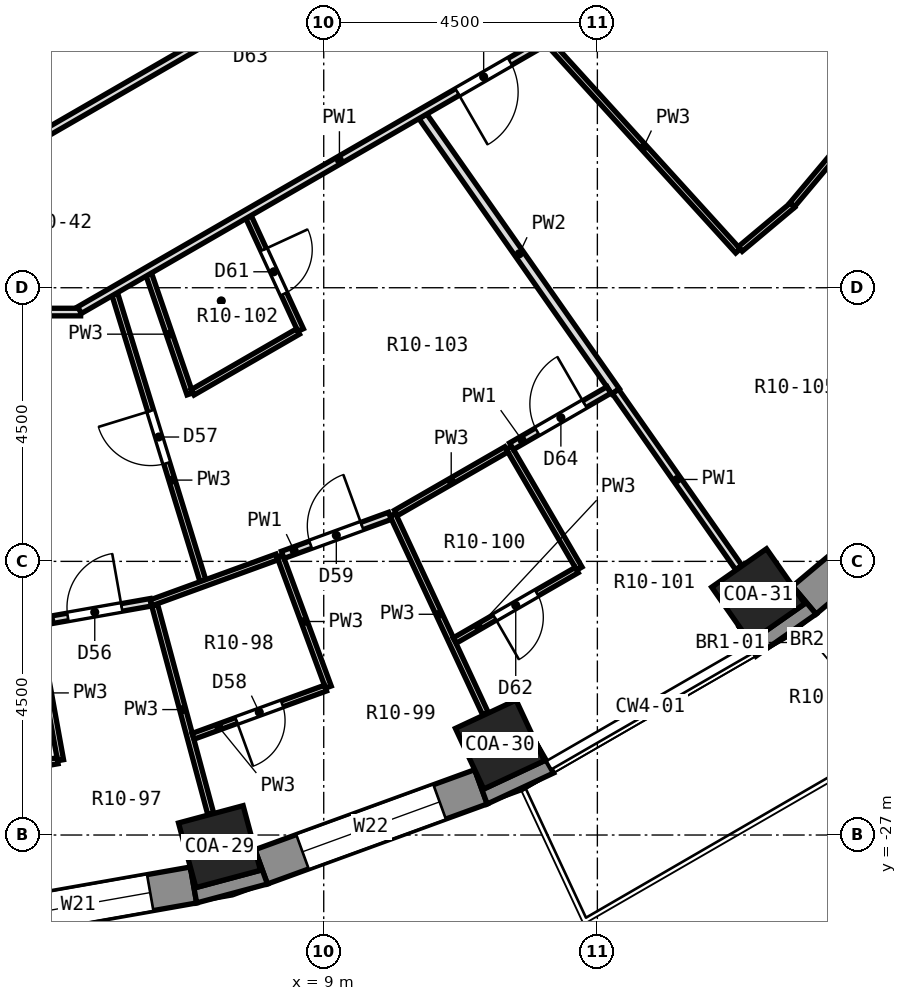
"""IFC4 building model, lengths in metres.
Left out: names, types, materials, properties, quantities, classifications, styles, units other than length and angle.
Written with IfcOpenShell. Run it as: python <this file> out.ifc"""

import sys

from ifc_helpers import new_model, si_unit, direction, frame, frame_2d, origin, origin_2d, place, context, subcontext, project, spatial, polyline, rectangle, outline, extrude, element, fill, save


model = new_model("IFC4")
c1 = context("Model", 3, precision=1e-05, world=origin(), true_north=direction((0.0, 1.0)))
c2 = subcontext(c1, "Body", "Model", "MODEL_VIEW")
j1 = project(units=[si_unit("LENGTHUNIT", "METRE"), si_unit("PLANEANGLEUNIT", "RADIAN")], contexts=[c1])
p1 = place(None, origin())
s1 = spatial("IfcSite", under=j1, at=p1, CompositionType="ELEMENT")
p2 = place(p1, origin())
s2 = spatial("IfcBuilding", under=s1, at=p2, CompositionType="ELEMENT")
p3 = place(p2, frame((0.0, 0.0, 36.2)))
s3 = spatial("IfcBuildingStorey", under=s2, at=p3, CompositionType="ELEMENT", Elevation=36.2)
for number, where, z_axis, x_axis in (
    (1, (7.286, -27.191, 0.0), (0.0, 0.0, 1.0), (0.259, -0.966, 0.0)),
    (2, (11.897, -25.512, 0.0), (0.0, 0.0, 1.0), (0.423, -0.906, 0.0)),
    (3, (16.146, -23.059, 0.0), (0.0, 0.0, 1.0), (0.574, -0.819, 0.0)),
):
    element("IfcColumn", number, at=place(p3, frame(where, z_axis=z_axis, x_axis=x_axis)), inside=s3, PredefinedType="COLUMN", context=c2, shape_type="SweptSolid", body=[
        extrude(rectangle(XDim=1.1, YDim=1.1, at=origin_2d()), origin(), (0.0, 0.0, 1.0), 3.3),
    ])
p4 = place(p3, frame((3.071, -28.489, 0.0), z_axis=(0.0, 0.0, 1.0), x_axis=(0.984800809218, 0.173687553279, 0.0)))
e4 = element("IfcWall", 4, at=p4, inside=s3, PredefinedType="SOLIDWALL", context=c2, shape_type="SweptSolid", body=[
    extrude(rectangle(XDim=3.846, YDim=0.6, at=frame_2d((1.923, 0.0))), origin(), (0.0, 0.0, 1.0), 2.75),
])
p5 = place(p4, frame((0.723, 0.0, 0.9)))
e5 = element("IfcOpeningElement", 5, at=p5, cuts=e4, PredefinedType="OPENING", context=c2, shape_type="SweptSolid", body=[
    extrude(rectangle(XDim=2.4, YDim=1.8, at=frame_2d((1.2, 0.9))), frame((0.0, 0.312, 0.0), z_axis=(0.0, -1.0, 0.0), x_axis=(1.0, 0.0, 0.0)), (0.0, 0.0, 1.0), 0.624),
])
p6 = place(p3, frame((7.971, -27.523, 0.0), z_axis=(0.0, 0.0, 1.0), x_axis=(0.939689588564, 0.342028474173, 0.0)))
e6 = element("IfcWall", 6, at=p6, inside=s3, PredefinedType="SOLIDWALL", context=c2, shape_type="SweptSolid", body=[
    extrude(rectangle(XDim=3.846, YDim=0.6, at=frame_2d((1.923, 0.0))), origin(), (0.0, 0.0, 1.0), 2.75),
])
p7 = place(p6, frame((0.723, 0.0, 0.9)))
e7 = element("IfcOpeningElement", 7, at=p7, cuts=e6, PredefinedType="OPENING", context=c2, shape_type="SweptSolid", body=[
    extrude(rectangle(XDim=2.4, YDim=1.8, at=frame_2d((1.2, 0.9))), frame((0.0, 0.312, 0.0), z_axis=(0.0, -1.0, 0.0), x_axis=(1.0, 0.0, 0.0)), (0.0, 0.0, 1.0), 0.624),
])
p8 = place(p3, frame((16.904, -23.137, 0.0), z_axis=(0.0, 0.0, 1.0), x_axis=(0.766026164483, 0.642809392687, 0.0)))
e8 = element("IfcWall", 8, at=p8, inside=s3, PredefinedType="SOLIDWALL", context=c2, shape_type="SweptSolid", body=[
    extrude(rectangle(XDim=3.846, YDim=0.6, at=frame_2d((1.923, 0.0))), origin(), (0.0, 0.0, 1.0), 2.75),
])
p9 = place(p8, frame((1.023, 0.0, 0.0)))
e9 = element("IfcOpeningElement", 9, at=p9, cuts=e8, PredefinedType="OPENING", context=c2, shape_type="SweptSolid", body=[
    extrude(rectangle(XDim=1.8, YDim=2.4, at=frame_2d((0.9, 1.2))), frame((0.0, 0.312, 0.0), z_axis=(0.0, -1.0, 0.0), x_axis=(1.0, 0.0, 0.0)), (0.0, 0.0, 1.0), 0.624),
])
p10 = place(p3, origin())
e10 = element("IfcWall", 10, at=p10, inside=s3, PredefinedType="SOLIDWALL", context=c2, shape_type="SweptSolid", body=[
    extrude(outline(polyline([(6.91, -28.117), (8.074, -27.805), (7.869, -27.241), (7.959, -27.58), (6.897, -27.865), (6.806, -27.526), (6.91, -28.117)])), origin(), (0.0, 0.0, 1.0), 2.75),
])
p11 = place(p3, origin())
e11 = element("IfcWall", 11, at=p11, inside=s3, PredefinedType="SOLIDWALL", context=c2, shape_type="SweptSolid", body=[
    extrude(outline(polyline([(12.78, -25.981), (12.479, -25.461), (12.628, -25.779), (11.631, -26.243), (11.483, -25.926), (11.688, -26.49), (12.78, -25.981)])), origin(), (0.0, 0.0, 1.0), 2.75),
])
p12 = place(p3, origin())
e12 = element("IfcWall", 12, at=p12, inside=s3, PredefinedType="SOLIDWALL", context=c2, shape_type="SweptSolid", body=[
    extrude(outline(polyline([(16.11, -24.058), (17.097, -23.367), (16.711, -22.907), (16.912, -23.194), (16.011, -23.825), (15.81, -23.538), (16.11, -24.058)])), origin(), (0.0, 0.0, 1.0), 2.75),
])
p13 = place(p3, frame((4.271, -23.556, 0.0), z_axis=(0.0, 0.0, 1.0), x_axis=(0.178283818946, -0.983979105419, 0.0)))
e13 = element("IfcWall", 13, at=p13, inside=s3, PredefinedType="PARTITIONING", context=c2, shape_type="SweptSolid", body=[
    extrude(rectangle(XDim=2.25, YDim=0.1, at=frame_2d((1.125, 0.0))), origin(), (0.0, 0.0, 1.0), 2.75),
])
p14 = place(p3, frame((6.221, -23.225, 0.0), z_axis=(0.0, 0.0, 1.0), x_axis=(0.259393262225, -0.965771782313, 0.0)))
e14 = element("IfcWall", 14, at=p14, inside=s3, PredefinedType="PARTITIONING", context=c2, shape_type="SweptSolid", body=[
    extrude(rectangle(XDim=3.546, YDim=0.1, at=frame_2d((1.773, 0.0))), origin(), (0.0, 0.0, 1.0), 2.75),
])
p15 = place(p3, frame((5.563, -18.105, 0.0), z_axis=(0.0, 0.0, 1.0), x_axis=(0.293856171107, -0.955849648586, 0.0)))
e15 = element("IfcWall", 15, at=p15, inside=s3, PredefinedType="PARTITIONING", context=c2, shape_type="SweptSolid", body=[
    extrude(rectangle(XDim=4.93, YDim=0.1, at=frame_2d((2.465, 0.0))), origin(), (0.0, 0.0, 1.0), 2.75),
])
p16 = place(p15, frame((2.009, 0.0, 0.0)))
e16 = element("IfcOpeningElement", 16, at=p16, cuts=e15, PredefinedType="OPENING", context=c2, shape_type="SweptSolid", body=[
    extrude(rectangle(XDim=0.9, YDim=2.1, at=frame_2d((0.45, 1.05))), frame((0.0, 0.062, 0.0), z_axis=(0.0, -1.0, 0.0), x_axis=(1.0, 0.0, 0.0)), (0.0, 0.0, 1.0), 0.124),
])
p17 = place(p3, frame((6.123, -17.782, 0.0), z_axis=(0.0, 0.0, 1.0), x_axis=(0.325345833464, -0.945595097622, 0.0)))
e17 = element("IfcWall", 17, at=p17, inside=s3, PredefinedType="PARTITIONING", context=c2, shape_type="SweptSolid", body=[
    extrude(rectangle(XDim=2.077, YDim=0.1, at=frame_2d((1.039, 0.0))), origin(), (0.0, 0.0, 1.0), 2.75),
])
p18 = place(p3, frame((8.279, -22.41, 0.0), z_axis=(0.0, 0.0, 1.0), x_axis=(0.346546571046, -0.938032768136, 0.0)))
e18 = element("IfcWall", 18, at=p18, inside=s3, PredefinedType="PARTITIONING", context=c2, shape_type="SweptSolid", body=[
    extrude(rectangle(XDim=2.3, YDim=0.1, at=frame_2d((1.15, 0.0))), origin(), (0.0, 0.0, 1.0), 2.75),
])
p19 = place(p3, frame((7.763, -16.837, 0.0), z_axis=(0.0, 0.0, 1.0), x_axis=(0.418740408402, -0.908105979702, 0.0)))
e19 = element("IfcWall", 19, at=p19, inside=s3, PredefinedType="PARTITIONING", context=c2, shape_type="SweptSolid", body=[
    extrude(rectangle(XDim=2.046, YDim=0.1, at=frame_2d((1.023, 0.0))), origin(), (0.0, 0.0, 1.0), 2.75),
])
p20 = place(p19, frame((0.592, 0.0, 0.0)))
e20 = element("IfcOpeningElement", 20, at=p20, cuts=e19, PredefinedType="OPENING", context=c2, shape_type="SweptSolid", body=[
    extrude(rectangle(XDim=0.8, YDim=2.1, at=frame_2d((0.4, 1.05))), frame((0.0, 0.062, 0.0), z_axis=(0.0, -1.0, 0.0), x_axis=(1.0, 0.0, 0.0)), (0.0, 0.0, 1.0), 0.124),
])
p21 = place(p3, frame((10.135, -21.734, 0.0), z_axis=(0.0, 0.0, 1.0), x_axis=(0.422504004964, -0.906361057079, 0.0)))
e21 = element("IfcWall", 21, at=p21, inside=s3, PredefinedType="PARTITIONING", context=c2, shape_type="SweptSolid", body=[
    extrude(rectangle(XDim=3.609, YDim=0.1, at=frame_2d((1.805, 0.0))), origin(), (0.0, 0.0, 1.0), 2.75),
])
p22 = place(p3, frame((12.045, -20.631, 0.0), z_axis=(0.0, 0.0, 1.0), x_axis=(0.503937015779, -0.863740403204, 0.0)))
e22 = element("IfcWall", 22, at=p22, inside=s3, PredefinedType="PARTITIONING", context=c2, shape_type="SweptSolid", body=[
    extrude(rectangle(XDim=2.3, YDim=0.1, at=frame_2d((1.15, 0.0))), origin(), (0.0, 0.0, 1.0), 2.75),
])
p23 = place(p3, frame((10.63, -15.181, 0.0), z_axis=(0.0, 0.0, 1.0), x_axis=(0.573951755358, -0.818889114912, 0.0)))
e23 = element("IfcWall", 23, at=p23, inside=s3, PredefinedType="PARTITIONING", context=c2, shape_type="SweptSolid", body=[
    extrude(rectangle(XDim=5.523, YDim=0.15, at=frame_2d((2.761, 0.0))), origin(), (0.0, 0.0, 1.0), 2.75),
])
p24 = place(p3, frame((13.798, -19.705, 0.0), z_axis=(0.0, 0.0, 1.0), x_axis=(0.573494797188, -0.819209202584, 0.0)))
e24 = element("IfcWall", 24, at=p24, inside=s3, PredefinedType="PARTITIONING", context=c2, shape_type="SweptSolid", body=[
    extrude(rectangle(XDim=3.534, YDim=0.125, at=frame_2d((1.767, 0.0))), origin(), (0.0, 0.0, 1.0), 2.75),
])
p25 = place(p3, frame((12.708, -13.98, 0.0), z_axis=(0.0, 0.0, 1.0), x_axis=(0.672630660637, -0.739978374259, 0.0)))
e25 = element("IfcWall", 25, at=p25, inside=s3, PredefinedType="PARTITIONING", context=c2, shape_type="SweptSolid", body=[
    extrude(rectangle(XDim=4.615, YDim=0.1, at=frame_2d((2.307, 0.0))), origin(), (0.0, 0.0, 1.0), 2.75),
])
p26 = place(p3, frame((-4.867, -18.4, 0.0), z_axis=(0.0, 0.0, 1.0), x_axis=(1.0, 0.0, 0.0)))
e26 = element("IfcWall", 26, at=p26, inside=s3, PredefinedType="PARTITIONING", context=c2, shape_type="SweptSolid", body=[
    extrude(rectangle(XDim=9.87, YDim=0.125, at=frame_2d((4.935, 0.0))), origin(), (0.0, 0.0, 1.0), 2.75),
])
p27 = place(p26, frame((6.028, 0.0, 0.0)))
e27 = element("IfcOpeningElement", 27, at=p27, cuts=e26, PredefinedType="OPENING", context=c2, shape_type="SweptSolid", body=[
    extrude(rectangle(XDim=1.0, YDim=2.1, at=frame_2d((0.5, 1.05))), frame((0.0, 0.074, 0.0), z_axis=(0.0, -1.0, 0.0), x_axis=(1.0, 0.0, 0.0)), (0.0, 0.0, 1.0), 0.149),
])
p28 = place(p3, frame((2.341, -26.181, 0.0), z_axis=(0.0, 0.0, 1.0), x_axis=(0.984795222678, 0.173719225738, 0.0)))
e28 = element("IfcWall", 28, at=p28, inside=s3, PredefinedType="PARTITIONING", context=c2, shape_type="SweptSolid", body=[
    extrude(rectangle(XDim=2.317, YDim=0.1, at=frame_2d((1.159, 0.0))), origin(), (0.0, 0.0, 1.0), 2.75),
])
p29 = place(p28, frame((0.759, 0.0, 0.0)))
e29 = element("IfcOpeningElement", 29, at=p29, cuts=e28, PredefinedType="OPENING", context=c2, shape_type="SweptSolid", body=[
    extrude(rectangle(XDim=0.8, YDim=2.1, at=frame_2d((0.4, 1.05))), frame((0.0, 0.062, 0.0), z_axis=(0.0, -1.0, 0.0), x_axis=(1.0, 0.0, 0.0)), (0.0, 0.0, 1.0), 0.124),
])
p30 = place(p3, frame((4.311, -23.498, 0.0), z_axis=(0.0, 0.0, 1.0), x_axis=(0.984797974945, 0.173703622713, 0.0)))
e30 = element("IfcWall", 30, at=p30, inside=s3, PredefinedType="PARTITIONING", context=c2, shape_type="SweptSolid", body=[
    extrude(rectangle(XDim=1.875, YDim=0.125, at=frame_2d((0.938, 0.0))), origin(), (0.0, 0.0, 1.0), 2.75),
])
p31 = place(p30, frame((0.488, 0.0, 0.0)))
e31 = element("IfcOpeningElement", 31, at=p31, cuts=e30, PredefinedType="OPENING", context=c2, shape_type="SweptSolid", body=[
    extrude(rectangle(XDim=0.9, YDim=2.1, at=frame_2d((0.45, 1.05))), frame((0.0, 0.074, 0.0), z_axis=(0.0, -1.0, 0.0), x_axis=(1.0, 0.0, 0.0)), (0.0, 0.0, 1.0), 0.149),
])
p32 = place(p3, frame((6.851, -25.377, 0.0), z_axis=(0.0, 0.0, 1.0), x_axis=(0.939679567759, 0.342056004093, 0.0)))
e32 = element("IfcWall", 32, at=p32, inside=s3, PredefinedType="PARTITIONING", context=c2, shape_type="SweptSolid", body=[
    extrude(rectangle(XDim=2.318, YDim=0.1, at=frame_2d((1.159, 0.0))), origin(), (0.0, 0.0, 1.0), 2.75),
])
p33 = place(p32, frame((0.758, 0.0, 0.0)))
e33 = element("IfcOpeningElement", 33, at=p33, cuts=e32, PredefinedType="OPENING", context=c2, shape_type="SweptSolid", body=[
    extrude(rectangle(XDim=0.8, YDim=2.1, at=frame_2d((0.4, 1.05))), frame((0.0, 0.062, 0.0), z_axis=(0.0, -1.0, 0.0), x_axis=(1.0, 0.0, 0.0)), (0.0, 0.0, 1.0), 0.124),
])
p34 = place(p3, frame((6.159, -23.181, 0.0), z_axis=(0.0, 0.0, 1.0), x_axis=(0.939696437289, 0.342009657388, 0.0)))
e34 = element("IfcWall", 34, at=p34, inside=s3, PredefinedType="PARTITIONING", context=c2, shape_type="SweptSolid", body=[
    extrude(rectangle(XDim=2.206, YDim=0.1, at=frame_2d((1.103, 0.0))), origin(), (0.0, 0.0, 1.0), 2.75),
])
p35 = place(p3, frame((8.326, -22.393, 0.0), z_axis=(0.0, 0.0, 1.0), x_axis=(0.939656514106, 0.342119329325, 0.0)))
e35 = element("IfcWall", 35, at=p35, inside=s3, PredefinedType="PARTITIONING", context=c2, shape_type="SweptSolid", body=[
    extrude(rectangle(XDim=1.875, YDim=0.125, at=frame_2d((0.938, 0.0))), origin(), (0.0, 0.0, 1.0), 2.75),
])
p36 = place(p35, frame((0.488, 0.0, 0.0)))
e36 = element("IfcOpeningElement", 36, at=p36, cuts=e35, PredefinedType="OPENING", context=c2, shape_type="SweptSolid", body=[
    extrude(rectangle(XDim=0.9, YDim=2.1, at=frame_2d((0.45, 1.05))), frame((0.0, 0.074, 0.0), z_axis=(0.0, -1.0, 0.0), x_axis=(1.0, 0.0, 0.0)), (0.0, 0.0, 1.0), 0.149),
])
p37 = place(p3, frame((10.189, -21.703, 0.0), z_axis=(0.0, 0.0, 1.0), x_axis=(0.866587299052, 0.499025503479, 0.0)))
e37 = element("IfcWall", 37, at=p37, inside=s3, PredefinedType="PARTITIONING", context=c2, shape_type="SweptSolid", body=[
    extrude(rectangle(XDim=2.093, YDim=0.1, at=frame_2d((1.046, 0.0))), origin(), (0.0, 0.0, 1.0), 2.75),
])
p38 = place(p3, frame((11.154, -23.802, 0.0), z_axis=(0.0, 0.0, 1.0), x_axis=(0.865918825327, 0.500184553885, 0.0)))
e38 = element("IfcWall", 38, at=p38, inside=s3, PredefinedType="PARTITIONING", context=c2, shape_type="SweptSolid", body=[
    extrude(rectangle(XDim=2.317, YDim=0.1, at=frame_2d((1.158, 0.0))), origin(), (0.0, 0.0, 1.0), 2.75),
])
p39 = place(p38, frame((0.759, 0.0, 0.0)))
e39 = element("IfcOpeningElement", 39, at=p39, cuts=e38, PredefinedType="OPENING", context=c2, shape_type="SweptSolid", body=[
    extrude(rectangle(XDim=0.8, YDim=2.1, at=frame_2d((0.4, 1.05))), frame((0.0, 0.062, 0.0), z_axis=(0.0, -1.0, 0.0), x_axis=(1.0, 0.0, 0.0)), (0.0, 0.0, 1.0), 0.124),
])
p40 = place(p3, frame((12.088, -20.606, 0.0), z_axis=(0.0, 0.0, 1.0), x_axis=(0.866049284889, 0.499958634432, 0.0)))
e40 = element("IfcWall", 40, at=p40, inside=s3, PredefinedType="PARTITIONING", context=c2, shape_type="SweptSolid", body=[
    extrude(rectangle(XDim=1.849, YDim=0.125, at=frame_2d((0.925, 0.0))), origin(), (0.0, 0.0, 1.0), 2.75),
])
p41 = place(p40, frame((0.487, 0.0, 0.0)))
e41 = element("IfcOpeningElement", 41, at=p41, cuts=e40, PredefinedType="OPENING", context=c2, shape_type="SweptSolid", body=[
    extrude(rectangle(XDim=0.9, YDim=2.1, at=frame_2d((0.45, 1.05))), frame((0.0, 0.074, 0.0), z_axis=(0.0, -1.0, 0.0), x_axis=(1.0, 0.0, 0.0)), (0.0, 0.0, 1.0), 0.149),
])
p42 = place(p3, frame((6.842, -19.721, 0.0), z_axis=(0.0, 0.0, 1.0), x_axis=(0.866104386261, 0.499863173377, 0.0)))
e42 = element("IfcWall", 42, at=p42, inside=s3, PredefinedType="PARTITIONING", context=c2, shape_type="SweptSolid", body=[
    extrude(rectangle(XDim=2.002, YDim=0.1, at=frame_2d((1.001, 0.0))), origin(), (0.0, 0.0, 1.0), 2.75),
])
p43 = place(p3, frame((4.984, -18.369, 0.0), z_axis=(0.0, 0.0, 1.0), x_axis=(0.86605048973, 0.49995654735, 0.0)))
e43 = element("IfcWall", 43, at=p43, inside=s3, PredefinedType="PARTITIONING", context=c2, shape_type="SweptSolid", body=[
    extrude(rectangle(XDim=9.871, YDim=0.125, at=frame_2d((4.935, 0.0))), origin(), (0.0, 0.0, 1.0), 2.75),
])
p44 = place(p43, frame((7.174, 0.0, 0.0)))
e44 = element("IfcOpeningElement", 44, at=p44, cuts=e43, PredefinedType="OPENING", context=c2, shape_type="SweptSolid", body=[
    extrude(rectangle(XDim=1.0, YDim=2.1, at=frame_2d((0.5, 1.05))), frame((0.0, 0.074, 0.0), z_axis=(0.0, -1.0, 0.0), x_axis=(1.0, 0.0, 0.0)), (0.0, 0.0, 1.0), 0.149),
])
p45 = place(p3, frame((4.234, -15.569, 0.0), z_axis=(0.0, 0.0, 1.0), x_axis=(0.866028570666, 0.499994514761, 0.0)))
e45 = element("IfcWall", 45, at=p45, inside=s3, PredefinedType="PARTITIONING", context=c2, shape_type="SweptSolid", body=[
    extrude(rectangle(XDim=8.234, YDim=0.125, at=frame_2d((4.117, 0.0))), origin(), (0.0, 0.0, 1.0), 2.75),
])
p46 = place(p45, frame((3.617, 0.0, 0.0)))
e46 = element("IfcOpeningElement", 46, at=p46, cuts=e45, PredefinedType="OPENING", context=c2, shape_type="SweptSolid", body=[
    extrude(rectangle(XDim=1.0, YDim=2.1, at=frame_2d((0.5, 1.05))), frame((0.0, 0.074, 0.0), z_axis=(0.0, -1.0, 0.0), x_axis=(1.0, 0.0, 0.0)), (0.0, 0.0, 1.0), 0.149),
])
p47 = place(p3, frame((15.85, -17.363, 0.0), z_axis=(0.0, 0.0, 1.0), x_axis=(0.766277754486, 0.642509457502, 0.0)))
e47 = element("IfcWall", 47, at=p47, inside=s3, PredefinedType="PARTITIONING", context=c2, shape_type="SweptSolid", body=[
    extrude(rectangle(XDim=1.124, YDim=0.1, at=frame_2d((0.562, 0.0))), origin(), (0.0, 0.0, 1.0), 2.75),
])
p48 = place(p3, frame((16.705, -16.635, 0.0), z_axis=(0.0, 0.0, 1.0), x_axis=(0.642869335103, 0.765975859923, 0.0)))
e48 = element("IfcWall", 48, at=p48, inside=s3, PredefinedType="PARTITIONING", context=c2, shape_type="SweptSolid", body=[
    extrude(rectangle(XDim=4.01, YDim=0.1, at=frame_2d((2.005, 0.0))), origin(), (0.0, 0.0, 1.0), 2.75),
])
p49 = place(p5, origin())
e49 = element("IfcWindow", 49, at=p49, inside=s3, PartitioningType="SINGLE_PANEL", PredefinedType="WINDOW", context=c2, shape_type="SweptSolid", body=[
    extrude(rectangle(XDim=2.4, YDim=1.8, at=frame_2d((1.2, 0.9))), frame((0.0, 0.18, 0.0), z_axis=(0.0, -1.0, 0.0), x_axis=(1.0, 0.0, 0.0)), (0.0, 0.0, 1.0), 0.06),
])
fill(e5, e49)
p50 = place(p7, origin())
e50 = element("IfcWindow", 50, at=p50, inside=s3, PartitioningType="SINGLE_PANEL", PredefinedType="WINDOW", context=c2, shape_type="SweptSolid", body=[
    extrude(rectangle(XDim=2.4, YDim=1.8, at=frame_2d((1.2, 0.9))), frame((0.0, 0.18, 0.0), z_axis=(0.0, -1.0, 0.0), x_axis=(1.0, 0.0, 0.0)), (0.0, 0.0, 1.0), 0.06),
])
fill(e7, e50)
p51 = place(p31, origin())
e51 = element("IfcDoor", 51, at=p51, inside=s3, OperationType="SINGLE_SWING_RIGHT", PredefinedType="DOOR", context=c2, shape_type="SweptSolid", body=[
    extrude(rectangle(XDim=0.9, YDim=2.1, at=frame_2d((0.45, 1.05))), frame((0.0, 0.025, 0.0), z_axis=(0.0, -1.0, 0.0), x_axis=(1.0, 0.0, 0.0)), (0.0, 0.0, 1.0), 0.05),
])
fill(e31, e51)
p52 = place(p16, frame((0.9, 0.0, 0.0), z_axis=(0.0, 0.0, 1.0), x_axis=(-1.0, 0.0, 0.0)))
e52 = element("IfcDoor", 52, at=p52, inside=s3, OperationType="SINGLE_SWING_RIGHT", PredefinedType="DOOR", context=c2, shape_type="SweptSolid", body=[
    extrude(rectangle(XDim=0.9, YDim=2.1, at=frame_2d((0.45, 1.05))), frame((0.0, 0.025, 0.0), z_axis=(0.0, -1.0, 0.0), x_axis=(1.0, 0.0, 0.0)), (0.0, 0.0, 1.0), 0.05),
])
fill(e16, e52)
p53 = place(p33, frame((0.8, 0.0, 0.0), z_axis=(0.0, 0.0, 1.0), x_axis=(-1.0, 0.0, 0.0)))
e53 = element("IfcDoor", 53, at=p53, inside=s3, OperationType="SINGLE_SWING_RIGHT", PredefinedType="DOOR", context=c2, shape_type="SweptSolid", body=[
    extrude(rectangle(XDim=0.8, YDim=2.1, at=frame_2d((0.4, 1.05))), frame((0.0, 0.025, 0.0), z_axis=(0.0, -1.0, 0.0), x_axis=(1.0, 0.0, 0.0)), (0.0, 0.0, 1.0), 0.05),
])
fill(e33, e53)
p54 = place(p36, origin())
e54 = element("IfcDoor", 54, at=p54, inside=s3, OperationType="SINGLE_SWING_RIGHT", PredefinedType="DOOR", context=c2, shape_type="SweptSolid", body=[
    extrude(rectangle(XDim=0.9, YDim=2.1, at=frame_2d((0.45, 1.05))), frame((0.0, 0.025, 0.0), z_axis=(0.0, -1.0, 0.0), x_axis=(1.0, 0.0, 0.0)), (0.0, 0.0, 1.0), 0.05),
])
fill(e36, e54)
p55 = place(p20, origin())
e55 = element("IfcDoor", 55, at=p55, inside=s3, OperationType="SINGLE_SWING_LEFT", PredefinedType="DOOR", context=c2, shape_type="SweptSolid", body=[
    extrude(rectangle(XDim=0.8, YDim=2.1, at=frame_2d((0.4, 1.05))), frame((0.0, 0.025, 0.0), z_axis=(0.0, -1.0, 0.0), x_axis=(1.0, 0.0, 0.0)), (0.0, 0.0, 1.0), 0.05),
])
fill(e20, e55)
p56 = place(p39, frame((0.8, 0.0, 0.0), z_axis=(0.0, 0.0, 1.0), x_axis=(-1.0, 0.0, 0.0)))
e56 = element("IfcDoor", 56, at=p56, inside=s3, OperationType="SINGLE_SWING_RIGHT", PredefinedType="DOOR", context=c2, shape_type="SweptSolid", body=[
    extrude(rectangle(XDim=0.8, YDim=2.1, at=frame_2d((0.4, 1.05))), frame((0.0, 0.025, 0.0), z_axis=(0.0, -1.0, 0.0), x_axis=(1.0, 0.0, 0.0)), (0.0, 0.0, 1.0), 0.05),
])
fill(e39, e56)
p57 = place(p41, origin())
e57 = element("IfcDoor", 57, at=p57, inside=s3, OperationType="SINGLE_SWING_RIGHT", PredefinedType="DOOR", context=c2, shape_type="SweptSolid", body=[
    extrude(rectangle(XDim=0.9, YDim=2.1, at=frame_2d((0.45, 1.05))), frame((0.0, 0.025, 0.0), z_axis=(0.0, -1.0, 0.0), x_axis=(1.0, 0.0, 0.0)), (0.0, 0.0, 1.0), 0.05),
])
fill(e41, e57)
p58 = place(p44, frame((1.0, 0.0, 0.0), z_axis=(0.0, 0.0, 1.0), x_axis=(-1.0, 0.0, 0.0)))
e58 = element("IfcDoor", 58, at=p58, inside=s3, OperationType="SINGLE_SWING_RIGHT", PredefinedType="DOOR", context=c2, shape_type="SweptSolid", body=[
    extrude(rectangle(XDim=1.0, YDim=2.1, at=frame_2d((0.5, 1.05))), frame((0.0, 0.025, 0.0), z_axis=(0.0, -1.0, 0.0), x_axis=(1.0, 0.0, 0.0)), (0.0, 0.0, 1.0), 0.05),
])
fill(e44, e58)
save(model, sys.argv[1])
